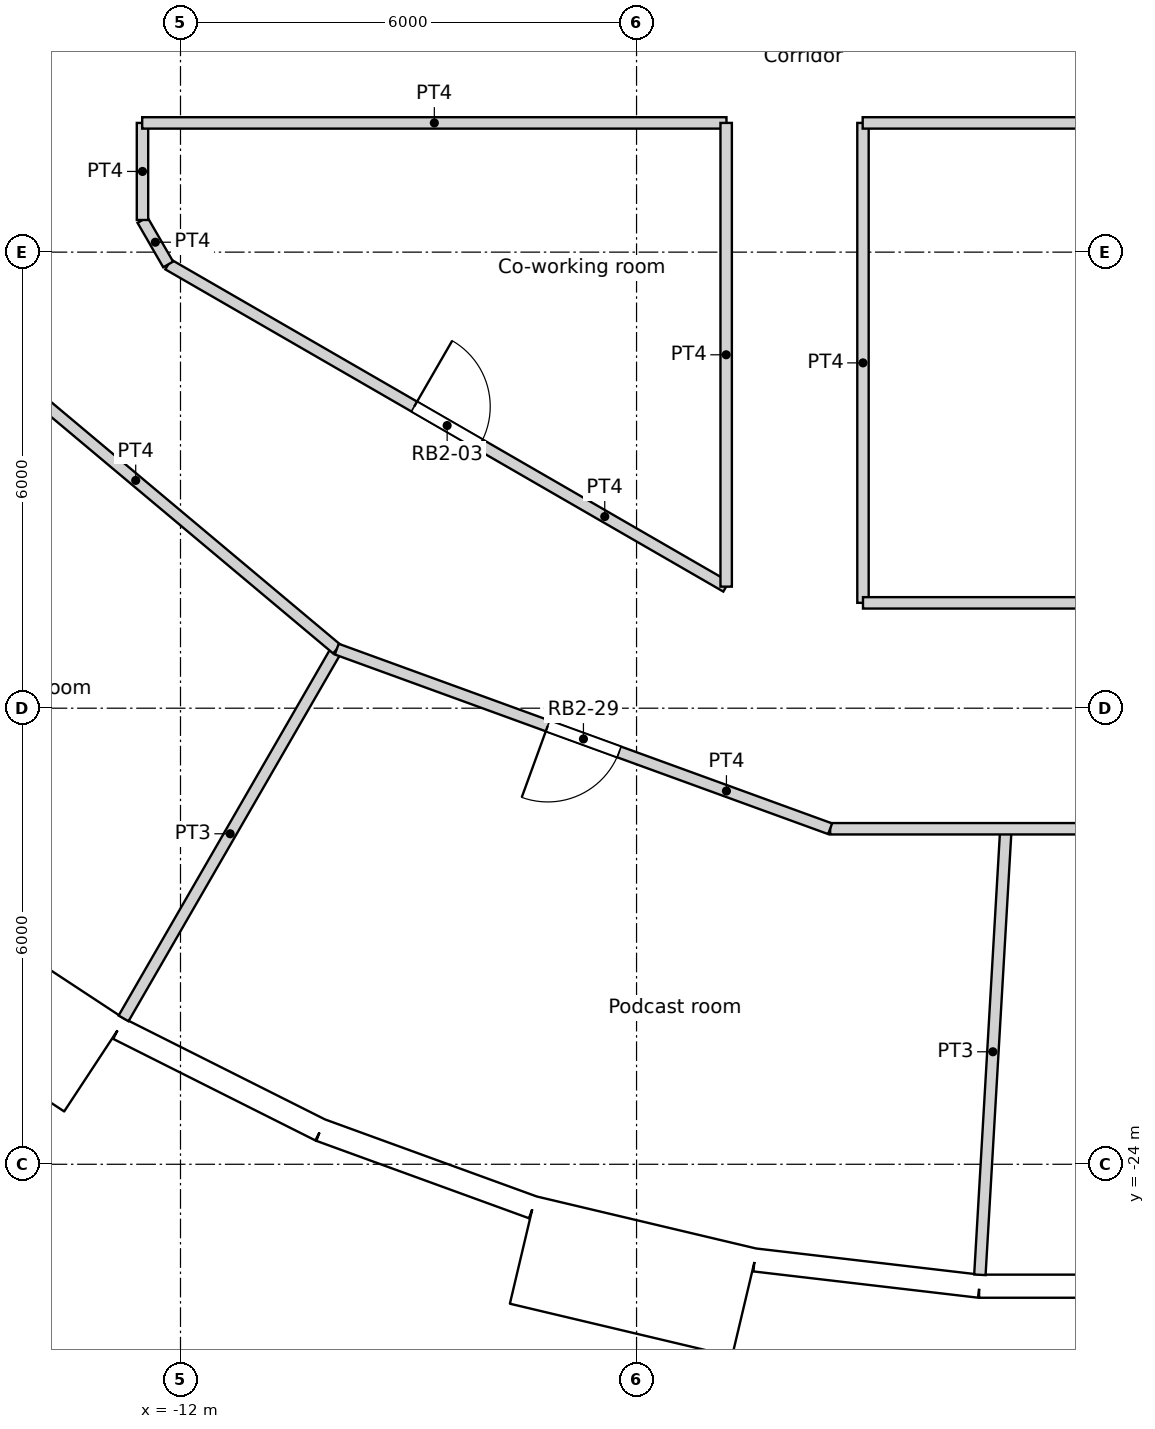
"""IFC4 building model, lengths in metres.
Left out: names, types, materials, properties, quantities, classifications, styles, units other than length and angle.
Written with IfcOpenShell. Run it as: python <this file> out.ifc"""

import sys

from ifc_helpers import new_model, si_unit, direction, frame, frame_2d, origin, origin_2d, place, context, subcontext, project, spatial, rectangle, circle, extrude, element, fill, save


model = new_model("IFC4")
c1 = context("Model", 3, precision=1e-05, world=origin(), true_north=direction((0.0, 1.0)))
c2 = subcontext(c1, "Body", "Model", "MODEL_VIEW")
j1 = project(units=[si_unit("LENGTHUNIT", "METRE"), si_unit("PLANEANGLEUNIT", "RADIAN")], contexts=[c1])
p1 = place(None, origin())
s1 = spatial("IfcSite", under=j1, at=p1, CompositionType="ELEMENT")
p2 = place(p1, origin())
s2 = spatial("IfcBuilding", under=s1, at=p2, CompositionType="ELEMENT")
p3 = place(p2, frame((0.0, 0.0, 136.8)))
s3 = spatial("IfcBuildingStorey", under=s2, at=p3, CompositionType="ELEMENT", Elevation=136.8)
for number, where, z_axis, x_axis in (
    (1, (-12.274, -21.259, 0.0), (0.0, 0.0, 1.0), (1.0, 0.0, 0.0)),
    (2, (-7.04, -23.516, 0.0), (0.0, 0.0, 1.0), (1.0, 0.0, 0.0)),
    (3, (-1.427, -24.506, 0.0), (0.0, 0.0, 1.0), (1.0, 0.0, 0.0)),
):
    element("IfcColumn", number, at=place(p3, frame(where, z_axis=z_axis, x_axis=x_axis)), inside=s3, PredefinedType="COLUMN", context=c2, shape_type="SweptSolid", body=[
        extrude(circle(Radius=0.6, at=origin_2d()), origin(), (0.0, 0.0, 1.0), 3.6),
    ])
for number, where, z_axis, x_axis in (
    (4, (-13.798, -12.802, 0.0), (0.0, 0.0, 1.0), (1.0, 0.0, 0.0)),
    (5, (-9.411, -16.301, 0.0), (0.0, 0.0, 1.0), (1.0, 0.0, 0.0)),
    (6, (-4.188, -18.35, 0.0), (0.0, 0.0, 1.0), (1.0, 0.0, 0.0)),
):
    element("IfcColumn", number, at=place(p3, frame(where, z_axis=z_axis, x_axis=x_axis)), inside=s3, PredefinedType="COLUMN", context=c2, shape_type="SweptSolid", body=[
        extrude(circle(Radius=0.65, at=origin_2d()), origin(), (0.0, 0.0, 1.0), 3.6),
    ])
p4 = place(p3, frame((-15.639, -21.048, -0.3), z_axis=(0.0, 0.0, 1.0), x_axis=(0.835514416706, -0.549468524554, 0.0)))
e7 = element("IfcWall", 7, at=p4, inside=s3, PredefinedType="ELEMENTEDWALL", context=c2, shape_type="SweptSolid", body=[
    extrude(rectangle(XDim=3.0, YDim=1.45, at=frame_2d((1.5, 0.0))), origin(), (0.0, 0.0, 1.0), 3.6),
])
p5 = place(p4, frame((1.5, 0.0, 1.85)))
e8 = element("IfcOpeningElement", 8, at=p5, cuts=e7, PredefinedType="OPENING", context=c2, shape_type="SweptSolid", body=[
    extrude(circle(Radius=0.9, at=origin_2d()), frame((0.0, 0.735, 0.0), z_axis=(0.0, -1.0, 0.0), x_axis=(1.0, 0.0, 0.0)), (0.0, 0.0, 1.0), 1.47),
])
p6 = place(p3, frame((-12.815, -22.216, 0.0), z_axis=(0.0, 0.0, 1.0), x_axis=(0.893637442555, -0.448789618045, 0.0)))
e9 = element("IfcWall", 9, at=p6, inside=s3, PredefinedType="SOLIDWALL", context=c2, shape_type="SweptSolid", body=[
    extrude(rectangle(XDim=2.973, YDim=0.3, at=frame_2d((1.486, 0.0))), origin(), (0.0, 0.0, 1.0), 2.8),
])
p7 = place(p6, frame((1.486, 0.0, 1.55)))
e10 = element("IfcOpeningElement", 10, at=p7, cuts=e9, PredefinedType="OPENING", context=c2, shape_type="SweptSolid", body=[
    extrude(circle(Radius=0.9, at=origin_2d()), frame((0.0, 0.16, 0.0), z_axis=(0.0, -1.0, 0.0), x_axis=(1.0, 0.0, 0.0)), (0.0, 0.0, 1.0), 0.32),
])
p8 = place(p3, frame((-10.158, -23.55, 0.0), z_axis=(0.0, 0.0, 1.0), x_axis=(0.939690282133, -0.342026568652, 0.0)))
e11 = element("IfcWall", 11, at=p8, inside=s3, PredefinedType="SOLIDWALL", context=c2, shape_type="SweptSolid", body=[
    extrude(rectangle(XDim=2.973, YDim=0.3, at=frame_2d((1.486, 0.0))), origin(), (0.0, 0.0, 1.0), 3.3),
])
p9 = place(p8, frame((1.486, 0.0, 1.55)))
e12 = element("IfcOpeningElement", 12, at=p9, cuts=e11, PredefinedType="OPENING", context=c2, shape_type="SweptSolid", body=[
    extrude(circle(Radius=0.9, at=origin_2d()), frame((0.0, 0.16, 0.0), z_axis=(0.0, -1.0, 0.0), x_axis=(1.0, 0.0, 0.0)), (0.0, 0.0, 1.0), 0.32),
])
p10 = place(p3, frame((-7.497, -25.127, -0.3), z_axis=(0.0, 0.0, 1.0), x_axis=(0.973042333261, -0.23062657627, 0.0)))
e13 = element("IfcWall", 13, at=p10, inside=s3, PredefinedType="ELEMENTEDWALL", context=c2, shape_type="SweptSolid", body=[
    extrude(rectangle(XDim=3.0, YDim=1.45, at=frame_2d((1.5, 0.0))), origin(), (0.0, 0.0, 1.0), 3.6),
])
p11 = place(p10, frame((1.5, 0.0, 1.85)))
e14 = element("IfcOpeningElement", 14, at=p11, cuts=e13, PredefinedType="OPENING", context=c2, shape_type="SweptSolid", body=[
    extrude(circle(Radius=0.9, at=origin_2d()), frame((0.0, 0.735, 0.0), z_axis=(0.0, -1.0, 0.0), x_axis=(1.0, 0.0, 0.0)), (0.0, 0.0, 1.0), 1.47),
])
p12 = place(p3, frame((-4.444, -25.259, 0.0), z_axis=(0.0, 0.0, 1.0), x_axis=(0.993245010522, -0.1160359818, 0.0)))
e15 = element("IfcWall", 15, at=p12, inside=s3, PredefinedType="SOLIDWALL", context=c2, shape_type="SweptSolid", body=[
    extrude(rectangle(XDim=2.973, YDim=0.3, at=frame_2d((1.486, 0.0))), origin(), (0.0, 0.0, 1.0), 2.8),
])
p13 = place(p12, frame((1.486, 0.0, 1.55)))
e16 = element("IfcOpeningElement", 16, at=p13, cuts=e15, PredefinedType="OPENING", context=c2, shape_type="SweptSolid", body=[
    extrude(circle(Radius=0.9, at=origin_2d()), frame((0.0, 0.16, 0.0), z_axis=(0.0, -1.0, 0.0), x_axis=(1.0, 0.0, 0.0)), (0.0, 0.0, 1.0), 0.32),
])
p14 = place(p3, frame((-1.491, -25.604, 0.0), z_axis=(0.0, 0.0, 1.0), x_axis=(1.0, 0.0, 0.0)))
e17 = element("IfcWall", 17, at=p14, inside=s3, PredefinedType="SOLIDWALL", context=c2, shape_type="SweptSolid", body=[
    extrude(rectangle(XDim=2.973, YDim=0.3, at=frame_2d((1.486, 0.0))), origin(), (0.0, 0.0, 1.0), 3.3),
])
p15 = place(p14, frame((1.486, 0.0, 1.55)))
e18 = element("IfcOpeningElement", 18, at=p15, cuts=e17, PredefinedType="OPENING", context=c2, shape_type="SweptSolid", body=[
    extrude(circle(Radius=0.9, at=origin_2d()), frame((0.0, 0.16, 0.0), z_axis=(0.0, -1.0, 0.0), x_axis=(1.0, 0.0, 0.0)), (0.0, 0.0, 1.0), 0.32),
])
p16 = place(p3, frame((-12.504, -10.3, 0.0), z_axis=(0.0, 0.0, 1.0), x_axis=(1.0, 0.0, 0.0)))
e19 = element("IfcWall", 19, at=p16, inside=s3, PredefinedType="PARTITIONING", context=c2, shape_type="SweptSolid", body=[
    extrude(rectangle(XDim=7.687, YDim=0.15, at=frame_2d((3.844, 0.0))), origin(), (0.0, 0.0, 1.0), 3.3),
])
p17 = place(p3, frame((-3.025, -10.3, 0.0), z_axis=(0.0, 0.0, 1.0), x_axis=(1.0, 0.0, 0.0)))
e20 = element("IfcWall", 20, at=p17, inside=s3, PredefinedType="PARTITIONING", context=c2, shape_type="SweptSolid", body=[
    extrude(rectangle(XDim=16.262, YDim=0.15, at=frame_2d((8.131, 0.0))), origin(), (0.0, 0.0, 1.0), 3.3),
])
p18 = place(p17, frame((7.287, 0.0, 0.0)))
e21 = element("IfcOpeningElement", 21, at=p18, cuts=e20, PredefinedType="OPENING", context=c2, shape_type="SweptSolid", body=[
    extrude(rectangle(XDim=0.95, YDim=2.1, at=frame_2d((0.475, 1.05))), frame((0.0, 0.075, 0.0), z_axis=(0.0, -1.0, 0.0), x_axis=(1.0, 0.0, 0.0)), (0.0, 0.0, 1.0), 0.15),
])
p19 = place(p3, frame((-12.5, -11.577, 0.0), z_axis=(0.0, 0.0, 1.0), x_axis=(0.0, 1.0, 0.0)))
e22 = element("IfcWall", 22, at=p19, inside=s3, PredefinedType="PARTITIONING", context=c2, shape_type="SweptSolid", body=[
    extrude(rectangle(XDim=1.277, YDim=0.15, at=frame_2d((0.638, 0.0))), origin(), (0.0, 0.0, 1.0), 3.3),
])
p20 = place(p3, frame((-12.5, -11.577, 0.0), z_axis=(0.0, 0.0, 1.0), x_axis=(0.500024767483, -0.866011103799, 0.0)))
e23 = element("IfcWall", 23, at=p20, inside=s3, PredefinedType="PARTITIONING", context=c2, shape_type="SweptSolid", body=[
    extrude(rectangle(XDim=0.676, YDim=0.15, at=frame_2d((0.338, 0.0))), origin(), (0.0, 0.0, 1.0), 3.3),
])
p21 = place(p3, frame((-15.235, -12.784, 0.0), z_axis=(0.0, 0.0, 1.0), x_axis=(0.766192104565, -0.642611592567, 0.0)))
e24 = element("IfcWall", 24, at=p21, inside=s3, PredefinedType="PARTITIONING", context=c2, shape_type="SweptSolid", body=[
    extrude(rectangle(XDim=6.906, YDim=0.15, at=frame_2d((3.453, 0.0))), origin(), (0.0, 0.0, 1.0), 3.3),
])
p22 = place(p3, frame((-12.162, -12.162, 0.0), z_axis=(0.0, 0.0, 1.0), x_axis=(0.866004766557, -0.500035743023, 0.0)))
e25 = element("IfcWall", 25, at=p22, inside=s3, PredefinedType="PARTITIONING", context=c2, shape_type="SweptSolid", body=[
    extrude(rectangle(XDim=8.477, YDim=0.15, at=frame_2d((4.239, 0.0))), origin(), (0.0, 0.0, 1.0), 3.3),
])
p23 = place(p22, frame((3.738, 0.0, 0.0)))
e26 = element("IfcOpeningElement", 26, at=p23, cuts=e25, PredefinedType="OPENING", context=c2, shape_type="SweptSolid", body=[
    extrude(rectangle(XDim=1.0, YDim=2.04, at=frame_2d((0.5, 1.02))), frame((0.0, 0.075, 0.0), z_axis=(0.0, -1.0, 0.0), x_axis=(1.0, 0.0, 0.0)), (0.0, 0.0, 1.0), 0.15),
])
p24 = place(p3, frame((-4.821, -16.401, 0.0), z_axis=(0.0, 0.0, 1.0), x_axis=(0.0, 1.0, 0.0)))
e27 = element("IfcWall", 27, at=p24, inside=s3, PredefinedType="PARTITIONING", context=c2, shape_type="SweptSolid", body=[
    extrude(rectangle(XDim=6.101, YDim=0.15, at=frame_2d((3.05, 0.0))), origin(), (0.0, 0.0, 1.0), 3.3),
])
p25 = place(p3, frame((-3.021, -16.614, 0.0), z_axis=(0.0, 0.0, 1.0), x_axis=(0.0, 1.0, 0.0)))
e28 = element("IfcWall", 28, at=p25, inside=s3, PredefinedType="PARTITIONING", context=c2, shape_type="SweptSolid", body=[
    extrude(rectangle(XDim=6.314, YDim=0.15, at=frame_2d((3.157, 0.0))), origin(), (0.0, 0.0, 1.0), 3.3),
])
p26 = place(p3, frame((-3.021, -16.614, 0.0), z_axis=(0.0, 0.0, 1.0), x_axis=(1.0, 0.0, 0.0)))
e29 = element("IfcWall", 29, at=p26, inside=s3, PredefinedType="PARTITIONING", context=c2, shape_type="SweptSolid", body=[
    extrude(rectangle(XDim=7.473, YDim=0.15, at=frame_2d((3.736, 0.0))), origin(), (0.0, 0.0, 1.0), 3.3),
])
p27 = place(p3, frame((-3.453, -19.586, 0.0), z_axis=(0.0, 0.0, 1.0), x_axis=(1.0, 0.0, 0.0)))
e30 = element("IfcWall", 30, at=p27, inside=s3, PredefinedType="PARTITIONING", context=c2, shape_type="SweptSolid", body=[
    extrude(rectangle(XDim=6.906, YDim=0.15, at=frame_2d((3.453, 0.0))), origin(), (0.0, 0.0, 1.0), 3.3),
])
p28 = place(p3, frame((-9.944, -17.223, 0.0), z_axis=(0.0, 0.0, 1.0), x_axis=(0.939672634566, -0.342075050021, 0.0)))
e31 = element("IfcWall", 31, at=p28, inside=s3, PredefinedType="PARTITIONING", context=c2, shape_type="SweptSolid", body=[
    extrude(rectangle(XDim=6.908, YDim=0.15, at=frame_2d((3.454, 0.0))), origin(), (0.0, 0.0, 1.0), 3.3),
])
p29 = place(p28, frame((2.954, 0.0, 0.0)))
e32 = element("IfcOpeningElement", 32, at=p29, cuts=e31, PredefinedType="OPENING", context=c2, shape_type="SweptSolid", body=[
    extrude(rectangle(XDim=1.0, YDim=2.04, at=frame_2d((0.5, 1.02))), frame((0.0, 0.075, 0.0), z_axis=(0.0, -1.0, 0.0), x_axis=(1.0, 0.0, 0.0)), (0.0, 0.0, 1.0), 0.15),
])
p30 = place(p3, frame((-12.749, -22.081, 0.0), z_axis=(0.0, 0.0, 1.0), x_axis=(0.500010020406, 0.866019618423, 0.0)))
e33 = element("IfcWall", 33, at=p30, inside=s3, PredefinedType="PARTITIONING", context=c2, shape_type="SweptSolid", body=[
    extrude(rectangle(XDim=5.61, YDim=0.15, at=frame_2d((2.805, 0.0))), origin(), (0.0, 0.0, 1.0), 3.3),
])
p31 = place(p3, frame((-1.483, -25.454, 0.0), z_axis=(0.0, 0.0, 1.0), x_axis=(0.058147412668, 0.998308007781, 0.0)))
e34 = element("IfcWall", 34, at=p31, inside=s3, PredefinedType="PARTITIONING", context=c2, shape_type="SweptSolid", body=[
    extrude(rectangle(XDim=5.878, YDim=0.15, at=frame_2d((2.939, 0.0))), origin(), (0.0, 0.0, 1.0), 3.3),
])
p32 = place(p5, origin())
e35 = element("IfcWindow", 35, at=p32, inside=s3, PartitioningType="SINGLE_PANEL", PredefinedType="WINDOW", context=c2, shape_type="SweptSolid", body=[
    extrude(circle(Radius=0.9, at=origin_2d()), frame((0.0, 0.695, 0.0), z_axis=(0.0, -1.0, 0.0), x_axis=(1.0, 0.0, 0.0)), (0.0, 0.0, 1.0), 0.1),
])
fill(e8, e35)
p33 = place(p7, origin())
e36 = element("IfcWindow", 36, at=p33, inside=s3, PartitioningType="SINGLE_PANEL", PredefinedType="WINDOW", context=c2, shape_type="SweptSolid", body=[
    extrude(circle(Radius=0.9, at=origin_2d()), frame((0.0, 0.12, 0.0), z_axis=(0.0, -1.0, 0.0), x_axis=(1.0, 0.0, 0.0)), (0.0, 0.0, 1.0), 0.1),
])
fill(e10, e36)
p34 = place(p9, origin())
e37 = element("IfcWindow", 37, at=p34, inside=s3, PartitioningType="SINGLE_PANEL", PredefinedType="WINDOW", context=c2, shape_type="SweptSolid", body=[
    extrude(circle(Radius=0.9, at=origin_2d()), frame((0.0, 0.12, 0.0), z_axis=(0.0, -1.0, 0.0), x_axis=(1.0, 0.0, 0.0)), (0.0, 0.0, 1.0), 0.1),
])
fill(e12, e37)
p35 = place(p11, origin())
e38 = element("IfcWindow", 38, at=p35, inside=s3, PartitioningType="SINGLE_PANEL", PredefinedType="WINDOW", context=c2, shape_type="SweptSolid", body=[
    extrude(circle(Radius=0.9, at=origin_2d()), frame((0.0, 0.695, 0.0), z_axis=(0.0, -1.0, 0.0), x_axis=(1.0, 0.0, 0.0)), (0.0, 0.0, 1.0), 0.1),
])
fill(e14, e38)
p36 = place(p13, origin())
e39 = element("IfcWindow", 39, at=p36, inside=s3, PartitioningType="SINGLE_PANEL", PredefinedType="WINDOW", context=c2, shape_type="SweptSolid", body=[
    extrude(circle(Radius=0.9, at=origin_2d()), frame((0.0, 0.12, 0.0), z_axis=(0.0, -1.0, 0.0), x_axis=(1.0, 0.0, 0.0)), (0.0, 0.0, 1.0), 0.1),
])
fill(e16, e39)
p37 = place(p15, origin())
e40 = element("IfcWindow", 40, at=p37, inside=s3, PartitioningType="SINGLE_PANEL", PredefinedType="WINDOW", context=c2, shape_type="SweptSolid", body=[
    extrude(circle(Radius=0.9, at=origin_2d()), frame((0.0, 0.12, 0.0), z_axis=(0.0, -1.0, 0.0), x_axis=(1.0, 0.0, 0.0)), (0.0, 0.0, 1.0), 0.1),
])
fill(e18, e40)
p38 = place(p23, origin())
e41 = element("IfcDoor", 41, at=p38, inside=s3, OperationType="SINGLE_SWING_LEFT", PredefinedType="DOOR", context=c2, shape_type="SweptSolid", body=[
    extrude(rectangle(XDim=1.0, YDim=2.04, at=frame_2d((0.5, 1.02))), frame((0.0, 0.025, 0.0), z_axis=(0.0, -1.0, 0.0), x_axis=(1.0, 0.0, 0.0)), (0.0, 0.0, 1.0), 0.05),
])
fill(e26, e41)
p39 = place(p29, origin())
e42 = element("IfcDoor", 42, at=p39, inside=s3, OperationType="SINGLE_SWING_RIGHT", PredefinedType="DOOR", context=c2, shape_type="SweptSolid", body=[
    extrude(rectangle(XDim=1.0, YDim=2.04, at=frame_2d((0.5, 1.02))), frame((0.0, 0.025, 0.0), z_axis=(0.0, -1.0, 0.0), x_axis=(1.0, 0.0, 0.0)), (0.0, 0.0, 1.0), 0.05),
])
fill(e32, e42)
save(model, sys.argv[1])
